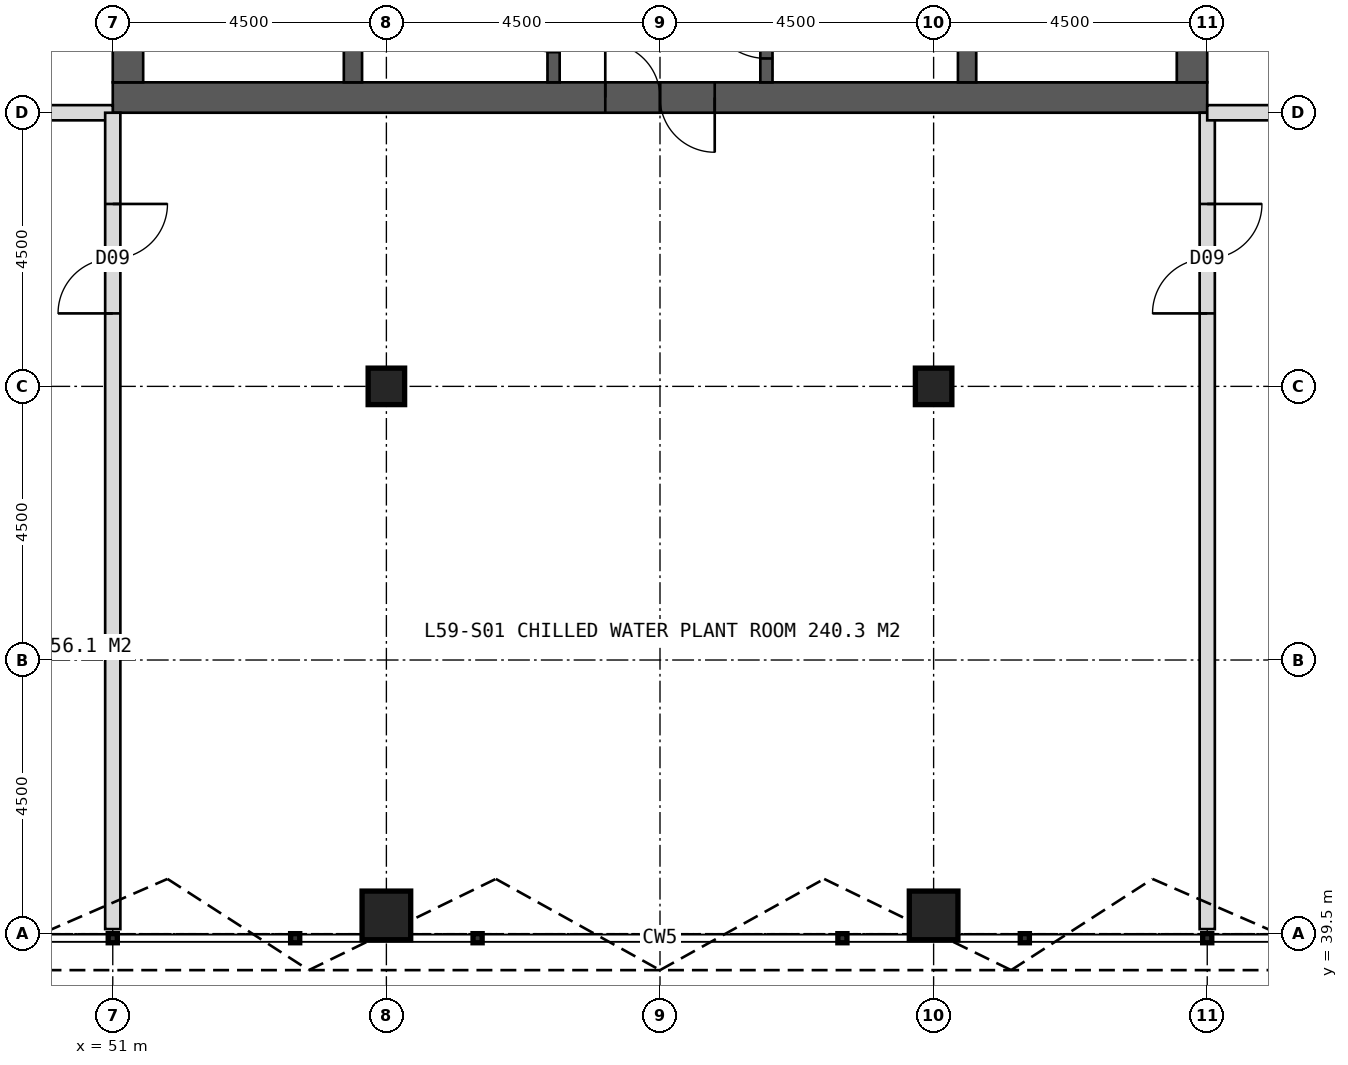
"""IFC4 building model, lengths in metres.
Left out: names, types, materials, properties, quantities, classifications, styles, units other than length and angle.
Written with IfcOpenShell. Run it as: python <this file> out.ifc"""

import sys

from ifc_helpers import new_model, si_unit, direction, frame, frame_2d, origin, origin_2d, place, context, subcontext, project, spatial, rectangle, hollow_rectangle, extrude, element, fill, save


model = new_model("IFC4")
c1 = context("Model", 3, precision=1e-05, world=origin(), true_north=direction((0.0, 1.0)))
c2 = subcontext(c1, "Body", "Model", "MODEL_VIEW")
j1 = project(units=[si_unit("LENGTHUNIT", "METRE"), si_unit("PLANEANGLEUNIT", "RADIAN")], contexts=[c1])
p1 = place(None, origin())
s1 = spatial("IfcSite", under=j1, at=p1, CompositionType="ELEMENT")
p2 = place(p1, origin())
s2 = spatial("IfcBuilding", under=s1, at=p2, CompositionType="ELEMENT")
p3 = place(p2, frame((0.0, 0.0, 245.0)))
s3 = spatial("IfcBuildingStorey", under=s2, at=p3, CompositionType="ELEMENT", Elevation=245.0)
p4 = place(p3, frame((51.0, 53.25, 0.0), z_axis=(0.0, 0.0, 1.0), x_axis=(1.0, 0.0, 0.0)))
e1 = element("IfcWall", 1, at=p4, inside=s3, PredefinedType="SHEAR", context=c2, shape_type="SweptSolid", body=[
    extrude(rectangle(XDim=18.0, YDim=0.5, at=frame_2d((9.0, 0.0))), origin(), (0.0, 0.0, 1.0), 5.0),
])
p5 = place(p4, frame((8.1, 0.0, 0.0)))
e2 = element("IfcOpeningElement", 2, at=p5, cuts=e1, PredefinedType="OPENING", context=c2, shape_type="SweptSolid", body=[
    extrude(rectangle(XDim=1.8, YDim=2.2, at=frame_2d((0.9, 1.1))), frame((0.0, 0.26, 0.0), z_axis=(0.0, -1.0, 0.0), x_axis=(1.0, 0.0, 0.0)), (0.0, 0.0, 1.0), 0.52),
])
p6 = place(p3, frame((51.25, 53.5, 0.0), z_axis=(0.0, 0.0, 1.0), x_axis=(0.0, 1.0, 0.0)))
e3 = element("IfcWall", 3, at=p6, inside=s3, PredefinedType="SHEAR", context=c2, shape_type="SweptSolid", body=[
    extrude(rectangle(XDim=17.0, YDim=0.5, at=frame_2d((8.5, 0.0))), origin(), (0.0, 0.0, 1.0), 5.0),
])
p7 = place(p6, frame((6.1, 0.0, 0.0)))
e4 = element("IfcOpeningElement", 4, at=p7, cuts=e3, PredefinedType="OPENING", context=c2, shape_type="SweptSolid", body=[
    extrude(rectangle(XDim=1.5, YDim=2.2, at=frame_2d((0.75, 1.1))), frame((0.0, 0.26, 0.0), z_axis=(0.0, -1.0, 0.0), x_axis=(1.0, 0.0, 0.0)), (0.0, 0.0, 1.0), 0.52),
])
p8 = place(p3, frame((68.75, 53.5, 0.0), z_axis=(0.0, 0.0, 1.0), x_axis=(0.0, 1.0, 0.0)))
e5 = element("IfcWall", 5, at=p8, inside=s3, PredefinedType="SHEAR", context=c2, shape_type="SweptSolid", body=[
    extrude(rectangle(XDim=17.0, YDim=0.5, at=frame_2d((8.5, 0.0))), origin(), (0.0, 0.0, 1.0), 5.0),
])
p9 = place(p8, frame((9.6, 0.0, 0.0)))
e6 = element("IfcOpeningElement", 6, at=p9, cuts=e5, PredefinedType="OPENING", context=c2, shape_type="SweptSolid", body=[
    extrude(rectangle(XDim=1.5, YDim=2.2, at=frame_2d((0.75, 1.1))), frame((0.0, 0.26, 0.0), z_axis=(0.0, -1.0, 0.0), x_axis=(1.0, 0.0, 0.0)), (0.0, 0.0, 1.0), 0.52),
])
for number, where, z_axis, x_axis in (
    (7, (54.95, 53.5, 0.0), (0.0, 0.0, 1.0), (0.0, 1.0, 0.0)),
    (8, (65.05, 53.5, 0.0), (0.0, 0.0, 1.0), (0.0, 1.0, 0.0)),
):
    element("IfcWall", number, at=place(p3, frame(where, z_axis=z_axis, x_axis=x_axis)), inside=s3, PredefinedType="SHEAR", context=c2, shape_type="SweptSolid", body=[
        extrude(rectangle(XDim=17.0, YDim=0.3, at=frame_2d((8.5, 0.0))), origin(), (0.0, 0.0, 1.0), 5.0),
    ])
p10 = place(p3, frame((58.25, 53.5, 0.0), z_axis=(0.0, 0.0, 1.0), x_axis=(0.0, 1.0, 0.0)))
e9 = element("IfcWall", 9, at=p10, inside=s3, PredefinedType="SHEAR", context=c2, shape_type="SweptSolid", body=[
    extrude(rectangle(XDim=17.0, YDim=0.2, at=frame_2d((8.5, 0.0))), origin(), (0.0, 0.0, 1.0), 5.0),
])
p11 = place(p10, frame((0.496, 0.0, 0.0)))
e10 = element("IfcOpeningElement", 10, at=p11, cuts=e9, PredefinedType="OPENING", context=c2, shape_type="SweptSolid", body=[
    extrude(rectangle(XDim=1.0, YDim=2.1, at=frame_2d((0.5, 1.05))), frame((0.0, 0.11, 0.0), z_axis=(0.0, -1.0, 0.0), x_axis=(1.0, 0.0, 0.0)), (0.0, 0.0, 1.0), 0.22),
])
p12 = place(p10, frame((2.646, 0.0, 0.0)))
e11 = element("IfcOpeningElement", 11, at=p12, cuts=e9, PredefinedType="OPENING", context=c2, shape_type="SweptSolid", body=[
    extrude(rectangle(XDim=1.0, YDim=2.1, at=frame_2d((0.5, 1.05))), frame((0.0, 0.11, 0.0), z_axis=(0.0, -1.0, 0.0), x_axis=(1.0, 0.0, 0.0)), (0.0, 0.0, 1.0), 0.22),
])
p13 = place(p10, frame((5.027, 0.0, 0.0)))
e12 = element("IfcOpeningElement", 12, at=p13, cuts=e9, PredefinedType="OPENING", context=c2, shape_type="SweptSolid", body=[
    extrude(rectangle(XDim=1.0, YDim=2.1, at=frame_2d((0.5, 1.05))), frame((0.0, 0.11, 0.0), z_axis=(0.0, -1.0, 0.0), x_axis=(1.0, 0.0, 0.0)), (0.0, 0.0, 1.0), 0.22),
])
p14 = place(p10, frame((7.126, 0.0, 0.0)))
e13 = element("IfcOpeningElement", 13, at=p14, cuts=e9, PredefinedType="OPENING", context=c2, shape_type="SweptSolid", body=[
    extrude(rectangle(XDim=1.0, YDim=2.1, at=frame_2d((0.5, 1.05))), frame((0.0, 0.11, 0.0), z_axis=(0.0, -1.0, 0.0), x_axis=(1.0, 0.0, 0.0)), (0.0, 0.0, 1.0), 0.22),
])
p15 = place(p3, frame((61.75, 53.5, 0.0), z_axis=(0.0, 0.0, 1.0), x_axis=(0.0, 1.0, 0.0)))
e14 = element("IfcWall", 14, at=p15, inside=s3, PredefinedType="SHEAR", context=c2, shape_type="SweptSolid", body=[
    extrude(rectangle(XDim=17.0, YDim=0.2, at=frame_2d((8.5, 0.0))), origin(), (0.0, 0.0, 1.0), 5.0),
])
p16 = place(p15, frame((0.393, 0.0, 0.0)))
e15 = element("IfcOpeningElement", 15, at=p16, cuts=e14, PredefinedType="OPENING", context=c2, shape_type="SweptSolid", body=[
    extrude(rectangle(XDim=1.0, YDim=2.1, at=frame_2d((0.5, 1.05))), frame((0.0, 0.11, 0.0), z_axis=(0.0, -1.0, 0.0), x_axis=(1.0, 0.0, 0.0)), (0.0, 0.0, 1.0), 0.22),
])
p17 = place(p15, frame((2.542, 0.0, 0.0)))
e16 = element("IfcOpeningElement", 16, at=p17, cuts=e14, PredefinedType="OPENING", context=c2, shape_type="SweptSolid", body=[
    extrude(rectangle(XDim=1.0, YDim=2.1, at=frame_2d((0.5, 1.05))), frame((0.0, 0.11, 0.0), z_axis=(0.0, -1.0, 0.0), x_axis=(1.0, 0.0, 0.0)), (0.0, 0.0, 1.0), 0.22),
])
p18 = place(p15, frame((5.127, 0.0, 0.0)))
e17 = element("IfcOpeningElement", 17, at=p18, cuts=e14, PredefinedType="OPENING", context=c2, shape_type="SweptSolid", body=[
    extrude(rectangle(XDim=1.0, YDim=2.1, at=frame_2d((0.5, 1.05))), frame((0.0, 0.11, 0.0), z_axis=(0.0, -1.0, 0.0), x_axis=(1.0, 0.0, 0.0)), (0.0, 0.0, 1.0), 0.22),
])
p19 = place(p15, frame((7.228, 0.0, 0.0)))
e18 = element("IfcOpeningElement", 18, at=p19, cuts=e14, PredefinedType="OPENING", context=c2, shape_type="SweptSolid", body=[
    extrude(rectangle(XDim=1.0, YDim=2.1, at=frame_2d((0.5, 1.05))), frame((0.0, 0.11, 0.0), z_axis=(0.0, -1.0, 0.0), x_axis=(1.0, 0.0, 0.0)), (0.0, 0.0, 1.0), 0.22),
])
for number, where, z_axis, x_axis in (
    (19, (55.5, 48.5, 0.0), (0.0, 0.0, 1.0), (1.0, 0.0, 0.0)),
    (20, (64.5, 48.5, 0.0), (0.0, 0.0, 1.0), (1.0, 0.0, 0.0)),
):
    element("IfcColumn", number, at=place(p3, frame(where, z_axis=z_axis, x_axis=x_axis)), inside=s3, PredefinedType="COLUMN", context=c2, shape_type="SweptSolid", body=[
        extrude(hollow_rectangle(XDim=0.6, YDim=0.6, WallThickness=0.04, at=origin_2d()), origin(), (0.0, 0.0, 1.0), 5.0),
    ])
for number, where, z_axis, x_axis in (
    (21, (55.5, 39.8, 0.0), (0.0, 0.0, 1.0), (1.0, 0.0, 0.0)),
    (22, (64.5, 39.8, 0.0), (0.0, 0.0, 1.0), (1.0, 0.0, 0.0)),
):
    element("IfcColumn", number, at=place(p3, frame(where, z_axis=z_axis, x_axis=x_axis)), inside=s3, PredefinedType="COLUMN", context=c2, shape_type="SweptSolid", body=[
        extrude(hollow_rectangle(XDim=0.8, YDim=0.8, WallThickness=0.08, at=origin_2d()), origin(), (0.0, 0.0, 1.0), 5.0),
    ])
p20 = place(p3, frame((51.0, 53.0, 0.0), z_axis=(0.0, 0.0, 1.0), x_axis=(-1.0, 0.0, 0.0)))
e23 = element("IfcWall", 23, at=p20, inside=s3, PredefinedType="SOLIDWALL", context=c2, shape_type="SweptSolid", body=[
    extrude(rectangle(XDim=13.425, YDim=0.25, at=frame_2d((6.712, 0.0))), origin(), (0.0, 0.0, 1.0), 4.75),
])
p21 = place(p20, frame((1.5, 0.0, 0.0)))
e24 = element("IfcOpeningElement", 24, at=p21, cuts=e23, PredefinedType="OPENING", context=c2, shape_type="SweptSolid", body=[
    extrude(rectangle(XDim=1.8, YDim=2.2, at=frame_2d((0.9, 1.1))), frame((0.0, 0.135, 0.0), z_axis=(0.0, -1.0, 0.0), x_axis=(1.0, 0.0, 0.0)), (0.0, 0.0, 1.0), 0.27),
])
p22 = place(p3, frame((51.0, 53.0, 0.0), z_axis=(0.0, 0.0, 1.0), x_axis=(0.0, -1.0, 0.0)))
e25 = element("IfcWall", 25, at=p22, inside=s3, PredefinedType="SOLIDWALL", context=c2, shape_type="SweptSolid", body=[
    extrude(rectangle(XDim=13.425, YDim=0.25, at=frame_2d((6.712, 0.0))), origin(), (0.0, 0.0, 1.0), 4.75),
])
p23 = place(p22, frame((1.5, 0.0, 0.0)))
e26 = element("IfcOpeningElement", 26, at=p23, cuts=e25, PredefinedType="OPENING", context=c2, shape_type="SweptSolid", body=[
    extrude(rectangle(XDim=1.8, YDim=2.2, at=frame_2d((0.9, 1.1))), frame((0.0, 0.135, 0.0), z_axis=(0.0, -1.0, 0.0), x_axis=(1.0, 0.0, 0.0)), (0.0, 0.0, 1.0), 0.27),
])
p24 = place(p3, frame((69.0, 53.0, 0.0), z_axis=(0.0, 0.0, 1.0), x_axis=(0.0, -1.0, 0.0)))
e27 = element("IfcWall", 27, at=p24, inside=s3, PredefinedType="SOLIDWALL", context=c2, shape_type="SweptSolid", body=[
    extrude(rectangle(XDim=13.425, YDim=0.25, at=frame_2d((6.712, 0.0))), origin(), (0.0, 0.0, 1.0), 4.75),
])
p25 = place(p24, frame((1.5, 0.0, 0.0)))
e28 = element("IfcOpeningElement", 28, at=p25, cuts=e27, PredefinedType="OPENING", context=c2, shape_type="SweptSolid", body=[
    extrude(rectangle(XDim=1.8, YDim=2.2, at=frame_2d((0.9, 1.1))), frame((0.0, 0.135, 0.0), z_axis=(0.0, -1.0, 0.0), x_axis=(1.0, 0.0, 0.0)), (0.0, 0.0, 1.0), 0.27),
])
p26 = place(p3, frame((69.0, 53.0, 0.0), z_axis=(0.0, 0.0, 1.0), x_axis=(1.0, 0.0, 0.0)))
e29 = element("IfcWall", 29, at=p26, inside=s3, PredefinedType="SOLIDWALL", context=c2, shape_type="SweptSolid", body=[
    extrude(rectangle(XDim=13.425, YDim=0.25, at=frame_2d((6.712, 0.0))), origin(), (0.0, 0.0, 1.0), 4.75),
])
p27 = place(p26, frame((1.5, 0.0, 0.0)))
e30 = element("IfcOpeningElement", 30, at=p27, cuts=e29, PredefinedType="OPENING", context=c2, shape_type="SweptSolid", body=[
    extrude(rectangle(XDim=1.8, YDim=2.2, at=frame_2d((0.9, 1.1))), frame((0.0, 0.135, 0.0), z_axis=(0.0, -1.0, 0.0), x_axis=(1.0, 0.0, 0.0)), (0.0, 0.0, 1.0), 0.27),
])
p28 = place(p23, origin())
e31 = element("IfcDoor", 31, at=p28, inside=s3, OperationType="DOUBLE_DOOR_SINGLE_SWING", PredefinedType="DOOR", context=c2, shape_type="SweptSolid", body=[
    extrude(rectangle(XDim=1.8, YDim=2.2, at=frame_2d((0.9, 1.1))), frame((0.0, 0.025, 0.0), z_axis=(0.0, -1.0, 0.0), x_axis=(1.0, 0.0, 0.0)), (0.0, 0.0, 1.0), 0.05),
])
fill(e26, e31)
p29 = place(p25, origin())
e32 = element("IfcDoor", 32, at=p29, inside=s3, OperationType="DOUBLE_DOOR_SINGLE_SWING", PredefinedType="DOOR", context=c2, shape_type="SweptSolid", body=[
    extrude(rectangle(XDim=1.8, YDim=2.2, at=frame_2d((0.9, 1.1))), frame((0.0, 0.025, 0.0), z_axis=(0.0, -1.0, 0.0), x_axis=(1.0, 0.0, 0.0)), (0.0, 0.0, 1.0), 0.05),
])
fill(e28, e32)
p30 = place(p11, origin())
e33 = element("IfcDoor", 33, at=p30, inside=s3, OperationType="SINGLE_SWING_RIGHT", PredefinedType="DOOR", context=c2, shape_type="SweptSolid", body=[
    extrude(rectangle(XDim=1.0, YDim=2.1, at=frame_2d((0.5, 1.05))), frame((0.0, 0.025, 0.0), z_axis=(0.0, -1.0, 0.0), x_axis=(1.0, 0.0, 0.0)), (0.0, 0.0, 1.0), 0.05),
])
fill(e10, e33)
p31 = place(p16, origin())
e34 = element("IfcDoor", 34, at=p31, inside=s3, OperationType="SINGLE_SWING_RIGHT", PredefinedType="DOOR", context=c2, shape_type="SweptSolid", body=[
    extrude(rectangle(XDim=1.0, YDim=2.1, at=frame_2d((0.5, 1.05))), frame((0.0, 0.025, 0.0), z_axis=(0.0, -1.0, 0.0), x_axis=(1.0, 0.0, 0.0)), (0.0, 0.0, 1.0), 0.05),
])
fill(e15, e34)
p32 = place(p5, origin())
e35 = element("IfcDoor", 35, at=p32, inside=s3, OperationType="DOUBLE_DOOR_SINGLE_SWING", PredefinedType="DOOR", context=c2, shape_type="SweptSolid", body=[
    extrude(rectangle(XDim=1.8, YDim=2.2, at=frame_2d((0.9, 1.1))), frame((0.0, 0.025, 0.0), z_axis=(0.0, -1.0, 0.0), x_axis=(1.0, 0.0, 0.0)), (0.0, 0.0, 1.0), 0.05),
])
fill(e2, e35)
save(model, sys.argv[1])
